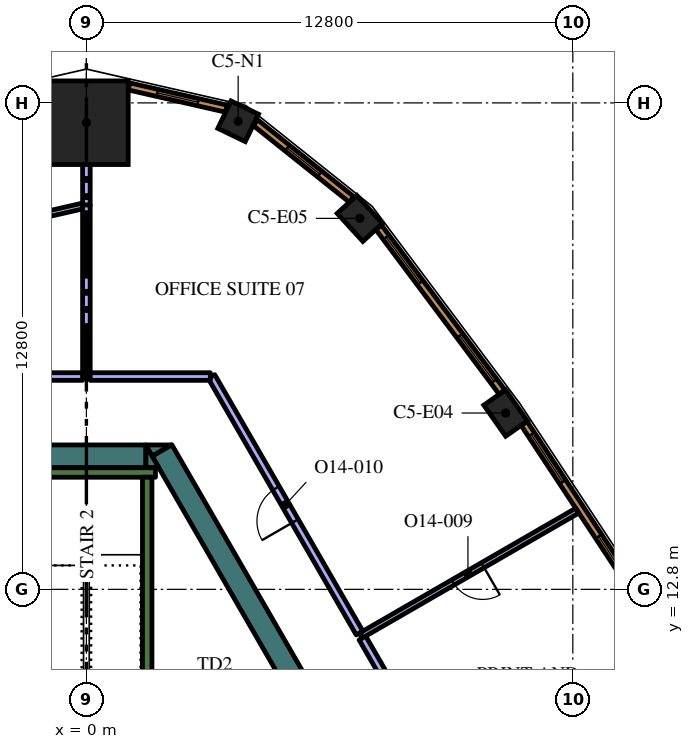
"""IFC4 building model, lengths in metres.
Left out: names, types, materials, properties, quantities, classifications, styles, units other than length and angle.
Written with IfcOpenShell. Run it as: python <this file> out.ifc"""

import sys

from ifc_helpers import new_model, si_unit, direction, frame, frame_2d, origin, origin_2d, place, context, subcontext, project, spatial, polyline, rectangle, outline, extrude, element, fill, save


model = new_model("IFC4")
c1 = context("Model", 3, precision=1e-05, world=origin(), true_north=direction((0.0, 1.0)))
c2 = subcontext(c1, "Body", "Model", "MODEL_VIEW")
j1 = project(units=[si_unit("LENGTHUNIT", "METRE"), si_unit("PLANEANGLEUNIT", "RADIAN")], contexts=[c1])
p1 = place(None, origin())
s1 = spatial("IfcSite", under=j1, at=p1, CompositionType="ELEMENT")
p2 = place(p1, origin())
s2 = spatial("IfcBuilding", under=s1, at=p2, CompositionType="ELEMENT")
p3 = place(p2, frame((0.0, 0.0, 309.0)))
s3 = spatial("IfcBuildingStorey", under=s2, at=p3, CompositionType="ELEMENT", Elevation=309.0)
p4 = place(p3, frame((0.0, 25.078, 0.0), z_axis=(0.0, 0.0, 1.0), x_axis=(0.0, 1.0, 0.0)))
e1 = element("IfcColumn", 1, at=p4, inside=s3, PredefinedType="COLUMN", context=c2, shape_type="SweptSolid", body=[
    extrude(rectangle(XDim=2.2, YDim=2.2, at=origin_2d()), origin(), (0.0, 0.0, 1.0), 4.2),
])
for number, where, z_axis, x_axis in (
    (2, (11.032, 17.44, 0.0), (0.0, 0.0, 1.0), (-0.575, 0.818, 0.0)),
    (3, (7.195, 22.561, 0.0), (0.0, 0.0, 1.0), (-0.676, 0.737, 0.0)),
):
    element("IfcColumn", number, at=place(p3, frame(where, z_axis=z_axis, x_axis=x_axis)), inside=s3, PredefinedType="COLUMN", context=c2, shape_type="SweptSolid", body=[
        extrude(rectangle(XDim=1.0, YDim=0.7, at=origin_2d()), origin(), (0.0, 0.0, 1.0), 4.2),
    ])
p5 = place(p3, frame((3.993, 25.116, 0.0), z_axis=(0.0, 0.0, 1.0), x_axis=(-0.900873321869, 0.434082086644, 0.0)))
e4 = element("IfcColumn", 4, at=p5, inside=s3, PredefinedType="COLUMN", context=c2, shape_type="SweptSolid", body=[
    extrude(rectangle(XDim=0.8, YDim=0.8, at=origin_2d()), origin(), (0.0, 0.0, 1.0), 4.2),
])
p6 = place(p3, frame((1.989, 16.456, 0.0), z_axis=(0.0, 0.0, 1.0), x_axis=(0.49999102663, -0.8660305845, 0.0)))
e5 = element("IfcWall", 5, at=p6, inside=s3, PredefinedType="SOLIDWALL", context=c2, shape_type="SweptSolid", body=[
    extrude(rectangle(XDim=12.406, YDim=0.6, at=frame_2d((6.203, 0.0))), origin(), (0.0, 0.0, 1.0), 4.2),
])
p7 = place(p3, origin())
e6 = element("IfcWall", 6, at=p7, inside=s3, PredefinedType="SOLIDWALL", context=c2, shape_type="SweptSolid", body=[
    extrude(outline(polyline([(1.559, 16.6), (2.235, 16.6), (1.728, 16.307), (1.559, 16.6)])), origin(), (0.0, 0.0, 1.0), 4.2),
])
p8 = place(p3, frame((-2.258, 16.3, 0.0), z_axis=(0.0, 0.0, 1.0), x_axis=(1.0, 0.0, 0.0)))
e7 = element("IfcWall", 7, at=p8, inside=s3, PredefinedType="SOLIDWALL", context=c2, shape_type="SweptSolid", body=[
    extrude(rectangle(XDim=3.823, YDim=0.6, at=frame_2d((1.912, 0.0))), origin(), (0.0, 0.0, 1.0), 4.2),
])
e8 = element("IfcWall", 8, at=p7, inside=s3, PredefinedType="SOLIDWALL", context=c2, shape_type="SweptSolid", body=[
    extrude(outline(polyline([(1.905, 16.0), (1.567, 16.0), (1.567, 16.585), (1.905, 16.0)])), origin(), (0.0, 0.0, 1.0), 4.2),
])
p9 = place(p3, frame((-1.817, 15.875, 0.0), z_axis=(0.0, 0.0, 1.0), x_axis=(1.0, 0.0, 0.0)))
e9 = element("IfcWall", 9, at=p9, inside=s3, PredefinedType="SOLIDWALL", context=c2, shape_type="SweptSolid", body=[
    extrude(rectangle(XDim=3.634, YDim=0.25, at=frame_2d((1.817, 0.0))), origin(), (0.0, 0.0, 1.0), 4.2),
])
p10 = place(p3, frame((1.6, 8.95, 0.0), z_axis=(0.0, 0.0, 1.0), x_axis=(0.0, 1.0, 0.0)))
e10 = element("IfcWall", 10, at=p10, inside=s3, PredefinedType="SOLIDWALL", context=c2, shape_type="SweptSolid", body=[
    extrude(rectangle(XDim=6.8, YDim=0.25, at=frame_2d((3.4, 0.0))), origin(), (0.0, 0.0, 1.0), 4.2),
])
p11 = place(p3, frame((12.918, 14.872, 0.0), z_axis=(0.0, 0.0, 1.0), x_axis=(-0.866033427365, -0.499986102494, 0.0)))
e11 = element("IfcWall", 11, at=p11, inside=s3, PredefinedType="PARTITIONING", context=c2, shape_type="SweptSolid", body=[
    extrude(rectangle(XDim=6.573, YDim=0.15, at=frame_2d((3.287, 0.0))), origin(), (0.0, 0.0, 1.0), 3.55),
])
p12 = place(p11, frame((2.873, 0.0, 0.0)))
e12 = element("IfcOpeningElement", 12, at=p12, cuts=e11, PredefinedType="OPENING", context=c2, shape_type="SweptSolid", body=[
    extrude(rectangle(XDim=0.9, YDim=2.1, at=frame_2d((0.45, 1.05))), frame((0.0, 0.085, 0.0), z_axis=(0.0, -1.0, 0.0), x_axis=(1.0, 0.0, 0.0)), (0.0, 0.0, 1.0), 0.17),
])
p13 = place(p3, frame((8.171, 9.948, 0.0), z_axis=(0.0, 0.0, 1.0), x_axis=(-0.500044545065, 0.865999684151, 0.0)))
e13 = element("IfcWall", 13, at=p13, inside=s3, PredefinedType="PARTITIONING", context=c2, shape_type="SweptSolid", body=[
    extrude(rectangle(XDim=1.815, YDim=0.2, at=frame_2d((0.908, 0.0))), origin(), (0.0, 0.0, 1.0), 3.55),
])
p14 = place(p3, frame((0.0, 22.906, 0.0), z_axis=(0.0, 0.0, 1.0), x_axis=(0.0, 1.0, 0.0)))
e14 = element("IfcWall", 14, at=p14, inside=s3, PredefinedType="PARTITIONING", context=c2, shape_type="SweptSolid", body=[
    extrude(rectangle(XDim=1.072, YDim=0.2, at=frame_2d((0.536, 0.0))), origin(), (0.0, 0.0, 1.0), 3.55),
])
p15 = place(p3, frame((0.0, 18.4, 0.0), z_axis=(0.0, 0.0, 1.0), x_axis=(0.0, 1.0, 0.0)))
e15 = element("IfcWall", 15, at=p15, inside=s3, PredefinedType="PARTITIONING", context=c2, shape_type="SweptSolid", body=[
    extrude(rectangle(XDim=4.514, YDim=0.2, at=frame_2d((2.257, 0.0))), origin(), (0.0, 0.0, 1.0), 3.55),
])
p16 = place(p3, frame((7.188, 11.65, 0.0), z_axis=(0.0, 0.0, 1.0), x_axis=(-0.499986368499, 0.866033273792, 0.0)))
e16 = element("IfcWall", 16, at=p16, inside=s3, PredefinedType="PARTITIONING", context=c2, shape_type="SweptSolid", body=[
    extrude(rectangle(XDim=7.794, YDim=0.2, at=frame_2d((3.897, 0.0))), origin(), (0.0, 0.0, 1.0), 3.55),
])
p17 = place(p16, frame((3.4, 0.0, 0.0)))
e17 = element("IfcOpeningElement", 17, at=p17, cuts=e16, PredefinedType="OPENING", context=c2, shape_type="SweptSolid", body=[
    extrude(rectangle(XDim=1.0, YDim=2.1, at=frame_2d((0.5, 1.05))), frame((0.0, 0.11, 0.0), z_axis=(0.0, -1.0, 0.0), x_axis=(1.0, 0.0, 0.0)), (0.0, 0.0, 1.0), 0.22),
])
p18 = place(p3, frame((3.261, 18.4, 0.0), z_axis=(0.0, 0.0, 1.0), x_axis=(-1.0, 0.0, 0.0)))
e18 = element("IfcWall", 18, at=p18, inside=s3, PredefinedType="PARTITIONING", context=c2, shape_type="SweptSolid", body=[
    extrude(rectangle(XDim=3.161, YDim=0.2, at=frame_2d((1.581, 0.0))), origin(), (0.0, 0.0, 1.0), 3.55),
])
p19 = place(p3, frame((-0.1, 22.887, 0.0), z_axis=(0.0, 0.0, 1.0), x_axis=(-0.974895716418, -0.222661945805, 0.0)))
e19 = element("IfcWall", 19, at=p19, inside=s3, PredefinedType="PARTITIONING", context=c2, shape_type="SweptSolid", body=[
    extrude(rectangle(XDim=2.605, YDim=0.15, at=frame_2d((1.303, 0.0))), origin(), (0.0, 0.0, 1.0), 3.55),
])
p20 = place(p3, frame((-0.1, 18.4, 0.0), z_axis=(0.0, 0.0, 1.0), x_axis=(-1.0, 0.0, 0.0)))
e20 = element("IfcWall", 20, at=p20, inside=s3, PredefinedType="PARTITIONING", context=c2, shape_type="SweptSolid", body=[
    extrude(rectangle(XDim=3.191, YDim=0.2, at=frame_2d((1.595, 0.0))), origin(), (0.0, 0.0, 1.0), 3.55),
])
p21 = place(p3, frame((14.496, 12.653, 0.0), z_axis=(0.0, 0.0, 1.0), x_axis=(-0.550744054781, 0.83467417962, 0.0)))
e21 = element("IfcWall", 21, at=p21, inside=s3, PredefinedType="SOLIDWALL", context=c2, shape_type="SweptSolid", body=[
    extrude(rectangle(XDim=5.406, YDim=0.19, at=frame_2d((2.703, 0.0))), origin(), (0.0, 0.0, 1.0), 3.95),
])
p22 = place(p21, frame((0.346, 0.0, 0.6)))
e22 = element("IfcOpeningElement", 22, at=p22, cuts=e21, PredefinedType="OPENING", context=c2, shape_type="SweptSolid", body=[
    extrude(rectangle(XDim=1.5, YDim=2.85, at=frame_2d((0.75, 1.425))), frame((0.0, 0.105, 0.0), z_axis=(0.0, -1.0, 0.0), x_axis=(1.0, 0.0, 0.0)), (0.0, 0.0, 1.0), 0.21),
])
p23 = place(p21, frame((3.559, 0.0, 0.6)))
e23 = element("IfcOpeningElement", 23, at=p23, cuts=e21, PredefinedType="OPENING", context=c2, shape_type="SweptSolid", body=[
    extrude(rectangle(XDim=1.5, YDim=2.85, at=frame_2d((0.75, 1.425))), frame((0.0, 0.105, 0.0), z_axis=(0.0, -1.0, 0.0), x_axis=(1.0, 0.0, 0.0)), (0.0, 0.0, 1.0), 0.21),
])
p24 = place(p3, frame((10.938, 17.99, 0.0), z_axis=(0.0, 0.0, 1.0), x_axis=(-0.599559865294, 0.800329911929, 0.0)))
e24 = element("IfcWall", 24, at=p24, inside=s3, PredefinedType="SOLIDWALL", context=c2, shape_type="SweptSolid", body=[
    extrude(rectangle(XDim=5.415, YDim=0.19, at=frame_2d((2.708, 0.0))), origin(), (0.0, 0.0, 1.0), 3.95),
])
p25 = place(p24, frame((0.358, 0.0, 0.6)))
e25 = element("IfcOpeningElement", 25, at=p25, cuts=e24, PredefinedType="OPENING", context=c2, shape_type="SweptSolid", body=[
    extrude(rectangle(XDim=1.5, YDim=2.85, at=frame_2d((0.75, 1.425))), frame((0.0, 0.105, 0.0), z_axis=(0.0, -1.0, 0.0), x_axis=(1.0, 0.0, 0.0)), (0.0, 0.0, 1.0), 0.21),
])
p26 = place(p24, frame((3.593, 0.0, 0.6)))
e26 = element("IfcOpeningElement", 26, at=p26, cuts=e24, PredefinedType="OPENING", context=c2, shape_type="SweptSolid", body=[
    extrude(rectangle(XDim=1.5, YDim=2.85, at=frame_2d((0.75, 1.425))), frame((0.0, 0.105, 0.0), z_axis=(0.0, -1.0, 0.0), x_axis=(1.0, 0.0, 0.0)), (0.0, 0.0, 1.0), 0.21),
])
p27 = place(p3, frame((6.977, 23.061, 0.0), z_axis=(0.0, 0.0, 1.0), x_axis=(-0.781626234064, 0.623747088349, 0.0)))
e27 = element("IfcWall", 27, at=p27, inside=s3, PredefinedType="SOLIDWALL", context=c2, shape_type="SweptSolid", body=[
    extrude(rectangle(XDim=3.237, YDim=0.19, at=frame_2d((1.618, 0.0))), origin(), (0.0, 0.0, 1.0), 3.95),
])
p28 = place(p27, frame((1.068, 0.0, 0.6)))
e28 = element("IfcOpeningElement", 28, at=p28, cuts=e27, PredefinedType="OPENING", context=c2, shape_type="SweptSolid", body=[
    extrude(rectangle(XDim=1.1, YDim=2.85, at=frame_2d((0.55, 1.425))), frame((0.0, 0.105, 0.0), z_axis=(0.0, -1.0, 0.0), x_axis=(1.0, 0.0, 0.0)), (0.0, 0.0, 1.0), 0.21),
])
p29 = place(p3, frame((3.683, 25.449, 0.0), z_axis=(0.0, 0.0, 1.0), x_axis=(-0.974913273386, 0.222585060988, 0.0)))
e29 = element("IfcWall", 29, at=p29, inside=s3, PredefinedType="SOLIDWALL", context=c2, shape_type="SweptSolid", body=[
    extrude(rectangle(XDim=2.627, YDim=0.19, at=frame_2d((1.313, 0.0))), origin(), (0.0, 0.0, 1.0), 3.95),
])
p30 = place(p29, frame((0.763, 0.0, 0.6)))
e30 = element("IfcOpeningElement", 30, at=p30, cuts=e29, PredefinedType="OPENING", context=c2, shape_type="SweptSolid", body=[
    extrude(rectangle(XDim=1.1, YDim=2.85, at=frame_2d((0.55, 1.425))), frame((0.0, 0.105, 0.0), z_axis=(0.0, -1.0, 0.0), x_axis=(1.0, 0.0, 0.0)), (0.0, 0.0, 1.0), 0.21),
])
p31 = place(p12, origin())
e31 = element("IfcDoor", 31, at=p31, inside=s3, OperationType="SINGLE_SWING_RIGHT", PredefinedType="DOOR", context=c2, shape_type="SweptSolid", body=[
    extrude(rectangle(XDim=0.9, YDim=2.1, at=frame_2d((0.45, 1.05))), frame((0.0, 0.025, 0.0), z_axis=(0.0, -1.0, 0.0), x_axis=(1.0, 0.0, 0.0)), (0.0, 0.0, 1.0), 0.05),
])
fill(e12, e31)
p32 = place(p17, origin())
e32 = element("IfcDoor", 32, at=p32, inside=s3, OperationType="SINGLE_SWING_RIGHT", PredefinedType="DOOR", context=c2, shape_type="SweptSolid", body=[
    extrude(rectangle(XDim=1.0, YDim=2.1, at=frame_2d((0.5, 1.05))), frame((0.0, 0.025, 0.0), z_axis=(0.0, -1.0, 0.0), x_axis=(1.0, 0.0, 0.0)), (0.0, 0.0, 1.0), 0.05),
])
fill(e17, e32)
p33 = place(p22, origin())
e33 = element("IfcWindow", 33, at=p33, inside=s3, PartitioningType="SINGLE_PANEL", PredefinedType="WINDOW", context=c2, shape_type="SweptSolid", body=[
    extrude(rectangle(XDim=1.5, YDim=2.85, at=frame_2d((0.75, 1.425))), frame((0.0, 0.045, 0.0), z_axis=(0.0, -1.0, 0.0), x_axis=(1.0, 0.0, 0.0)), (0.0, 0.0, 1.0), 0.06),
])
fill(e22, e33)
p34 = place(p23, origin())
e34 = element("IfcWindow", 34, at=p34, inside=s3, PartitioningType="SINGLE_PANEL", PredefinedType="WINDOW", context=c2, shape_type="SweptSolid", body=[
    extrude(rectangle(XDim=1.5, YDim=2.85, at=frame_2d((0.75, 1.425))), frame((0.0, 0.045, 0.0), z_axis=(0.0, -1.0, 0.0), x_axis=(1.0, 0.0, 0.0)), (0.0, 0.0, 1.0), 0.06),
])
fill(e23, e34)
p35 = place(p25, origin())
e35 = element("IfcWindow", 35, at=p35, inside=s3, PartitioningType="SINGLE_PANEL", PredefinedType="WINDOW", context=c2, shape_type="SweptSolid", body=[
    extrude(rectangle(XDim=1.5, YDim=2.85, at=frame_2d((0.75, 1.425))), frame((0.0, 0.045, 0.0), z_axis=(0.0, -1.0, 0.0), x_axis=(1.0, 0.0, 0.0)), (0.0, 0.0, 1.0), 0.06),
])
fill(e25, e35)
p36 = place(p26, origin())
e36 = element("IfcWindow", 36, at=p36, inside=s3, PartitioningType="SINGLE_PANEL", PredefinedType="WINDOW", context=c2, shape_type="SweptSolid", body=[
    extrude(rectangle(XDim=1.5, YDim=2.85, at=frame_2d((0.75, 1.425))), frame((0.0, 0.045, 0.0), z_axis=(0.0, -1.0, 0.0), x_axis=(1.0, 0.0, 0.0)), (0.0, 0.0, 1.0), 0.06),
])
fill(e26, e36)
p37 = place(p28, origin())
e37 = element("IfcWindow", 37, at=p37, inside=s3, PartitioningType="SINGLE_PANEL", PredefinedType="WINDOW", context=c2, shape_type="SweptSolid", body=[
    extrude(rectangle(XDim=1.1, YDim=2.85, at=frame_2d((0.55, 1.425))), frame((0.0, 0.045, 0.0), z_axis=(0.0, -1.0, 0.0), x_axis=(1.0, 0.0, 0.0)), (0.0, 0.0, 1.0), 0.06),
])
fill(e28, e37)
p38 = place(p30, origin())
e38 = element("IfcWindow", 38, at=p38, inside=s3, PartitioningType="SINGLE_PANEL", PredefinedType="WINDOW", context=c2, shape_type="SweptSolid", body=[
    extrude(rectangle(XDim=1.1, YDim=2.85, at=frame_2d((0.55, 1.425))), frame((0.0, 0.045, 0.0), z_axis=(0.0, -1.0, 0.0), x_axis=(1.0, 0.0, 0.0)), (0.0, 0.0, 1.0), 0.06),
])
fill(e30, e38)
save(model, sys.argv[1])
